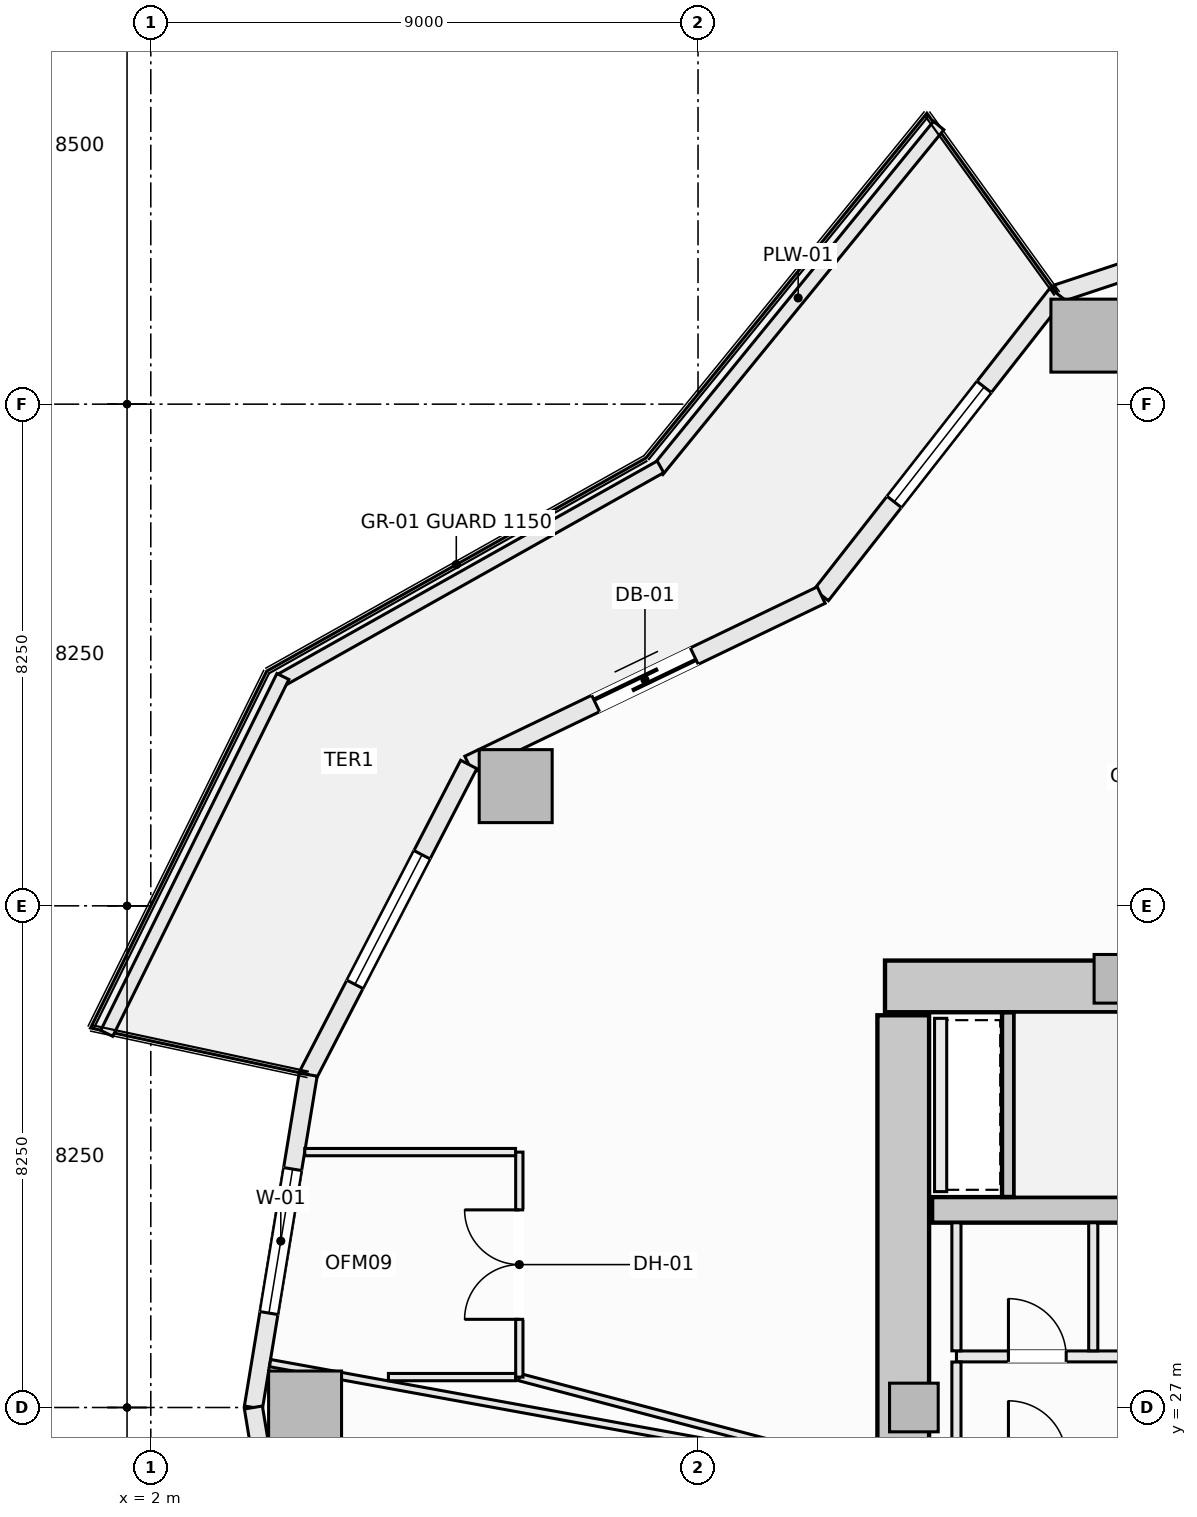
"""IFC4 building model, lengths in metres.
Left out: names, types, materials, properties, quantities, classifications, styles, units other than length and angle.
Written with IfcOpenShell. Run it as: python <this file> out.ifc"""

import sys

from ifc_helpers import new_model, si_unit, direction, frame, frame_2d, origin, origin_2d, place, context, subcontext, project, spatial, rectangle, extrude, element, fill, save


model = new_model("IFC4")
c1 = context("Model", 3, precision=1e-05, world=origin(), true_north=direction((0.0, 1.0)))
c2 = subcontext(c1, "Body", "Model", "MODEL_VIEW")
j1 = project(units=[si_unit("LENGTHUNIT", "METRE"), si_unit("PLANEANGLEUNIT", "RADIAN")], contexts=[c1])
p1 = place(None, origin())
s1 = spatial("IfcSite", under=j1, at=p1, CompositionType="ELEMENT")
p2 = place(p1, origin())
s2 = spatial("IfcBuilding", under=s1, at=p2, CompositionType="ELEMENT")
p3 = place(p2, frame((0.0, 0.0, 72.7)))
s3 = spatial("IfcBuildingStorey", under=s2, at=p3, CompositionType="ELEMENT", Elevation=72.7)
p4 = place(p3, frame((14.075, 33.925, -0.28), z_axis=(0.0, 0.0, 1.0), x_axis=(1.0, 0.0, 0.0)))
e1 = element("IfcWall", 1, at=p4, inside=s3, PredefinedType="SHEAR", context=c2, shape_type="SweptSolid", body=[
    extrude(rectangle(XDim=13.85, YDim=0.85, at=frame_2d((6.925, 0.0))), origin(), (0.0, 0.0, 1.0), 3.85),
])
p5 = place(p3, frame((14.375, 20.55, -0.28), z_axis=(0.0, 0.0, 1.0), x_axis=(0.0, 1.0, 0.0)))
e2 = element("IfcWall", 2, at=p5, inside=s3, PredefinedType="SHEAR", context=c2, shape_type="SweptSolid", body=[
    extrude(rectangle(XDim=12.9, YDim=0.85, at=frame_2d((6.45, 0.0))), origin(), (0.0, 0.0, 1.0), 3.85),
])
p6 = place(p3, frame((14.85, 30.25, -0.28), z_axis=(0.0, 0.0, 1.0), x_axis=(1.0, 0.0, 0.0)))
e3 = element("IfcWall", 3, at=p6, inside=s3, PredefinedType="SHEAR", context=c2, shape_type="SweptSolid", body=[
    extrude(rectangle(XDim=7.3, YDim=0.42, at=frame_2d((3.65, 0.0))), origin(), (0.0, 0.0, 1.0), 3.85),
])
for number, where, z_axis, x_axis in (
    (4, (17.404, 44.627, -0.28), (0.0, 0.0, 1.0), (1.0, 0.0, 0.0)),
    (5, (8.001, 37.219, -0.28), (0.0, 0.0, 1.0), (1.0, 0.0, 0.0)),
    (6, (4.538, 27.0, -0.28), (0.0, 0.0, 1.0), (1.0, 0.0, 0.0)),
):
    element("IfcColumn", number, at=place(p3, frame(where, z_axis=z_axis, x_axis=x_axis)), inside=s3, PredefinedType="COLUMN", context=c2, shape_type="SweptSolid", body=[
        extrude(rectangle(XDim=1.2, YDim=1.2, at=origin_2d()), origin(), (0.0, 0.0, 1.0), 3.85),
    ])
for number, where, z_axis, x_axis in (
    (7, (17.914, 34.05, -0.28), (0.0, 0.0, 1.0), (1.0, 0.0, 0.0)),
    (8, (14.55, 27.0, -0.28), (0.0, 0.0, 1.0), (1.0, 0.0, 0.0)),
):
    element("IfcColumn", number, at=place(p3, frame(where, z_axis=z_axis, x_axis=x_axis)), inside=s3, PredefinedType="PILASTER", context=c2, shape_type="SweptSolid", body=[
        extrude(rectangle(XDim=0.8, YDim=0.8, at=origin_2d()), origin(), (0.0, 0.0, 1.0), 3.85),
    ])
p7 = place(p3, frame((16.906, 45.316, 0.0), z_axis=(0.0, 0.0, 1.0), x_axis=(0.949245153629, 0.314537181127, 0.0)))
e9 = element("IfcWall", 9, at=p7, inside=s3, PredefinedType="SOLIDWALL", context=c2, shape_type="SweptSolid", body=[
    extrude(rectangle(XDim=6.717, YDim=0.3, at=frame_2d((3.358, 0.0))), origin(), (0.0, 0.0, 1.0), 3.093),
])
p8 = place(p7, frame((2.159, 0.0, 0.85)))
e10 = element("IfcOpeningElement", 10, at=p8, cuts=e9, PredefinedType="OPENING", context=c2, shape_type="SweptSolid", body=[
    extrude(rectangle(XDim=2.4, YDim=1.9, at=frame_2d((1.2, 0.95))), frame((0.0, 0.16, 0.0), z_axis=(0.0, -1.0, 0.0), x_axis=(1.0, 0.0, 0.0)), (0.0, 0.0, 1.0), 0.32),
])
p9 = place(p3, frame((13.026, 40.36, 0.0), z_axis=(0.0, 0.0, 1.0), x_axis=(0.616434798832, 0.78740595552, 0.0)))
e11 = element("IfcWall", 11, at=p9, inside=s3, PredefinedType="SOLIDWALL", context=c2, shape_type="SweptSolid", body=[
    extrude(rectangle(XDim=6.294, YDim=0.3, at=frame_2d((3.147, 0.0))), origin(), (0.0, 0.0, 1.0), 3.093),
])
p10 = place(p9, frame((1.947, 0.0, 0.85)))
e12 = element("IfcOpeningElement", 12, at=p10, cuts=e11, PredefinedType="OPENING", context=c2, shape_type="SweptSolid", body=[
    extrude(rectangle(XDim=2.4, YDim=1.9, at=frame_2d((1.2, 0.95))), frame((0.0, 0.16, 0.0), z_axis=(0.0, -1.0, 0.0), x_axis=(1.0, 0.0, 0.0)), (0.0, 0.0, 1.0), 0.32),
])
p11 = place(p3, frame((7.229, 37.575, 0.0), z_axis=(0.0, 0.0, 1.0), x_axis=(0.901354747727, 0.433081538224, 0.0)))
e13 = element("IfcWall", 13, at=p11, inside=s3, PredefinedType="SOLIDWALL", context=c2, shape_type="SweptSolid", body=[
    extrude(rectangle(XDim=6.431, YDim=0.3, at=frame_2d((3.215, 0.0))), origin(), (0.0, 0.0, 1.0), 3.093),
])
p12 = place(p11, frame((2.315, 0.0, 0.0)))
e14 = element("IfcOpeningElement", 14, at=p12, cuts=e13, PredefinedType="OPENING", context=c2, shape_type="SweptSolid", body=[
    extrude(rectangle(XDim=1.8, YDim=2.25, at=frame_2d((0.9, 1.125))), frame((0.0, 0.16, 0.0), z_axis=(0.0, -1.0, 0.0), x_axis=(1.0, 0.0, 0.0)), (0.0, 0.0, 1.0), 0.32),
])
p13 = place(p3, frame((4.588, 32.474, 0.0), z_axis=(0.0, 0.0, 1.0), x_axis=(0.459800981414, 0.888021991558, 0.0)))
e15 = element("IfcWall", 15, at=p13, inside=s3, PredefinedType="SOLIDWALL", context=c2, shape_type="SweptSolid", body=[
    extrude(rectangle(XDim=5.744, YDim=0.3, at=frame_2d((2.872, 0.0))), origin(), (0.0, 0.0, 1.0), 3.093),
])
p14 = place(p13, frame((1.672, 0.0, 0.85)))
e16 = element("IfcOpeningElement", 16, at=p14, cuts=e15, PredefinedType="OPENING", context=c2, shape_type="SweptSolid", body=[
    extrude(rectangle(XDim=2.4, YDim=1.9, at=frame_2d((1.2, 0.95))), frame((0.0, 0.16, 0.0), z_axis=(0.0, -1.0, 0.0), x_axis=(1.0, 0.0, 0.0)), (0.0, 0.0, 1.0), 0.32),
])
p15 = place(p3, frame((3.688, 27.0, 0.0), z_axis=(0.0, 0.0, 1.0), x_axis=(0.162386212206, 0.986727276447, 0.0)))
e17 = element("IfcWall", 17, at=p15, inside=s3, PredefinedType="SOLIDWALL", context=c2, shape_type="SweptSolid", body=[
    extrude(rectangle(XDim=5.548, YDim=0.3, at=frame_2d((2.774, 0.0))), origin(), (0.0, 0.0, 1.0), 3.093),
])
p16 = place(p15, frame((1.574, 0.0, 0.85)))
e18 = element("IfcOpeningElement", 18, at=p16, cuts=e17, PredefinedType="OPENING", context=c2, shape_type="SweptSolid", body=[
    extrude(rectangle(XDim=2.4, YDim=1.9, at=frame_2d((1.2, 0.95))), frame((0.0, 0.16, 0.0), z_axis=(0.0, -1.0, 0.0), x_axis=(1.0, 0.0, 0.0)), (0.0, 0.0, 1.0), 0.32),
])
p17 = place(p3, frame((3.688, 27.0, 0.0), z_axis=(0.0, 0.0, 1.0), x_axis=(0.162386212206, -0.986727276447, 0.0)))
e19 = element("IfcWall", 19, at=p17, inside=s3, PredefinedType="SOLIDWALL", context=c2, shape_type="SweptSolid", body=[
    extrude(rectangle(XDim=5.548, YDim=0.3, at=frame_2d((2.774, 0.0))), origin(), (0.0, 0.0, 1.0), 3.093),
])
p18 = place(p17, frame((1.574, 0.0, 0.85)))
e20 = element("IfcOpeningElement", 20, at=p18, cuts=e19, PredefinedType="OPENING", context=c2, shape_type="SweptSolid", body=[
    extrude(rectangle(XDim=2.4, YDim=1.9, at=frame_2d((1.2, 0.95))), frame((0.0, 0.16, 0.0), z_axis=(0.0, -1.0, 0.0), x_axis=(1.0, 0.0, 0.0)), (0.0, 0.0, 1.0), 0.32),
])
p19 = place(p3, frame((10.336, 42.411, 0.0), z_axis=(0.0, 0.0, 1.0), x_axis=(0.631819273026, 0.775115737315, 0.0)))
e21 = element("IfcWall", 21, at=p19, inside=s3, PredefinedType="PARAPET", context=c2, shape_type="SweptSolid", body=[
    extrude(rectangle(XDim=7.316, YDim=0.22, at=frame_2d((3.658, 0.0))), origin(), (0.0, 0.0, 1.0), 0.52),
])
p20 = place(p3, frame((4.147, 38.966, 0.0), z_axis=(0.0, 0.0, 1.0), x_axis=(0.871775109335, 0.489906275468, 0.0)))
e22 = element("IfcWall", 22, at=p20, inside=s3, PredefinedType="PARAPET", context=c2, shape_type="SweptSolid", body=[
    extrude(rectangle(XDim=7.152, YDim=0.22, at=frame_2d((3.576, 0.0))), origin(), (0.0, 0.0, 1.0), 0.52),
])
p21 = place(p3, frame((1.275, 33.153, 0.0), z_axis=(0.0, 0.0, 1.0), x_axis=(0.442686636348, 0.89667638644, 0.0)))
e23 = element("IfcWall", 23, at=p21, inside=s3, PredefinedType="PARAPET", context=c2, shape_type="SweptSolid", body=[
    extrude(rectangle(XDim=6.545, YDim=0.22, at=frame_2d((3.272, 0.0))), origin(), (0.0, 0.0, 1.0), 0.52),
])
p22 = place(p3, frame((16.1, 30.462, -0.28), z_axis=(0.0, 0.0, 1.0), x_axis=(0.0, 1.0, 0.0)))
e24 = element("IfcWall", 24, at=p22, inside=s3, PredefinedType="SHEAR", context=c2, shape_type="SweptSolid", body=[
    extrude(rectangle(XDim=3.036, YDim=0.2, at=frame_2d((1.518, 0.0))), origin(), (0.0, 0.0, 1.0), 3.85),
])
p23 = place(p3, frame((14.99, 30.55, 0.0), z_axis=(0.0, 0.0, 1.0), x_axis=(0.0, 1.0, 0.0)))
e25 = element("IfcWall", 25, at=p23, inside=s3, PredefinedType="SOLIDWALL", context=c2, shape_type="SweptSolid", body=[
    extrude(rectangle(XDim=2.85, YDim=0.2, at=frame_2d((1.425, 0.0))), origin(), (0.0, 0.0, 1.0), 3.57),
])
p24 = place(p3, frame((15.25, 27.84, 0.0), z_axis=(0.0, 0.0, 1.0), x_axis=(1.0, 0.0, 0.0)))
e26 = element("IfcWall", 26, at=p24, inside=s3, PredefinedType="SOLIDWALL", context=c2, shape_type="SweptSolid", body=[
    extrude(rectangle(XDim=6.9, YDim=0.18, at=frame_2d((3.45, 0.0))), origin(), (0.0, 0.0, 1.0), 3.57),
])
p25 = place(p24, frame((5.02, 0.0, 0.0)))
e27 = element("IfcOpeningElement", 27, at=p25, cuts=e26, PredefinedType="OPENING", context=c2, shape_type="SweptSolid", body=[
    extrude(rectangle(XDim=0.95, YDim=2.1, at=frame_2d((0.475, 1.05))), frame((0.0, 0.1, 0.0), z_axis=(0.0, -1.0, 0.0), x_axis=(1.0, 0.0, 0.0)), (0.0, 0.0, 1.0), 0.2),
])
p26 = place(p24, frame((0.855, 0.0, 0.0)))
e28 = element("IfcOpeningElement", 28, at=p26, cuts=e26, PredefinedType="OPENING", context=c2, shape_type="SweptSolid", body=[
    extrude(rectangle(XDim=0.95, YDim=2.1, at=frame_2d((0.475, 1.05))), frame((0.0, 0.1, 0.0), z_axis=(0.0, -1.0, 0.0), x_axis=(1.0, 0.0, 0.0)), (0.0, 0.0, 1.0), 0.2),
])
p27 = place(p24, frame((2.9, 0.0, 0.0)))
e29 = element("IfcOpeningElement", 29, at=p27, cuts=e26, PredefinedType="OPENING", context=c2, shape_type="SweptSolid", body=[
    extrude(rectangle(XDim=0.95, YDim=2.1, at=frame_2d((0.475, 1.05))), frame((0.0, 0.1, 0.0), z_axis=(0.0, -1.0, 0.0), x_axis=(1.0, 0.0, 0.0)), (0.0, 0.0, 1.0), 0.2),
])
p28 = place(p3, frame((15.25, 26.252, 0.0), z_axis=(0.0, 0.0, 1.0), x_axis=(0.0, 1.0, 0.0)))
e30 = element("IfcWall", 30, at=p28, inside=s3, PredefinedType="PARTITIONING", context=c2, shape_type="SweptSolid", body=[
    extrude(rectangle(XDim=1.496, YDim=0.15, at=frame_2d((0.748, 0.0))), origin(), (0.0, 0.0, 1.0), 3.57),
])
for number, where, z_axis, x_axis in (
    (31, (15.25, 27.932, 0.0), (0.0, 0.0, 1.0), (0.0, 1.0, 0.0)),
    (32, (17.5, 27.932, 0.0), (0.0, 0.0, 1.0), (0.0, 1.0, 0.0)),
):
    element("IfcWall", number, at=place(p3, frame(where, z_axis=z_axis, x_axis=x_axis)), inside=s3, PredefinedType="PARTITIONING", context=c2, shape_type="SweptSolid", body=[
        extrude(rectangle(XDim=2.106, YDim=0.15, at=frame_2d((1.053, 0.0))), origin(), (0.0, 0.0, 1.0), 3.57),
    ])
p29 = place(p3, frame((3.962, 27.73, 0.0), z_axis=(0.0, 0.0, 1.0), x_axis=(0.983849121981, -0.178999735131, 0.0)))
e33 = element("IfcWall", 33, at=p29, inside=s3, PredefinedType="PARTITIONING", context=c2, shape_type="SweptSolid", body=[
    extrude(rectangle(XDim=10.15, YDim=0.12, at=frame_2d((5.075, 0.0))), origin(), (0.0, 0.0, 1.0), 2.934),
])
p30 = place(p3, frame((8.061, 27.5, 0.0), z_axis=(0.0, 0.0, 1.0), x_axis=(0.96688100249, -0.255227598475, 0.0)))
e34 = element("IfcWall", 34, at=p30, inside=s3, PredefinedType="PARTITIONING", context=c2, shape_type="SweptSolid", body=[
    extrude(rectangle(XDim=4.582, YDim=0.12, at=frame_2d((2.291, 0.0))), origin(), (0.0, 0.0, 1.0), 2.934),
])
p31 = place(p3, frame((8.061, 27.5, 0.0), z_axis=(0.0, 0.0, 1.0), x_axis=(0.0, 1.0, 0.0)))
e35 = element("IfcWall", 35, at=p31, inside=s3, PredefinedType="PARTITIONING", context=c2, shape_type="SweptSolid", body=[
    extrude(rectangle(XDim=3.7, YDim=0.12, at=frame_2d((1.85, 0.0))), origin(), (0.0, 0.0, 1.0), 3.57),
])
p32 = place(p31, frame((0.95, 0.0, 0.0)))
e36 = element("IfcOpeningElement", 36, at=p32, cuts=e35, PredefinedType="OPENING", context=c2, shape_type="SweptSolid", body=[
    extrude(rectangle(XDim=1.8, YDim=2.3, at=frame_2d((0.9, 1.15))), frame((0.0, 0.07, 0.0), z_axis=(0.0, -1.0, 0.0), x_axis=(1.0, 0.0, 0.0)), (0.0, 0.0, 1.0), 0.14),
])
p33 = place(p3, frame((4.533, 31.2, 0.0), z_axis=(0.0, 0.0, 1.0), x_axis=(1.0, 0.0, 0.0)))
e37 = element("IfcWall", 37, at=p33, inside=s3, PredefinedType="PARTITIONING", context=c2, shape_type="SweptSolid", body=[
    extrude(rectangle(XDim=3.466, YDim=0.12, at=frame_2d((1.733, 0.0))), origin(), (0.0, 0.0, 1.0), 3.57),
])
p34 = place(p3, frame((5.908, 27.5, 0.0), z_axis=(0.0, 0.0, 1.0), x_axis=(1.0, 0.0, 0.0)))
e38 = element("IfcWall", 38, at=p34, inside=s3, PredefinedType="PARTITIONING", context=c2, shape_type="SweptSolid", body=[
    extrude(rectangle(XDim=2.091, YDim=0.12, at=frame_2d((1.045, 0.0))), origin(), (0.0, 0.0, 1.0), 3.57),
])
p35 = place(p10, origin())
e39 = element("IfcWindow", 39, at=p35, inside=s3, PartitioningType="SINGLE_PANEL", PredefinedType="WINDOW", context=c2, shape_type="SweptSolid", body=[
    extrude(rectangle(XDim=2.4, YDim=1.9, at=frame_2d((1.2, 0.95))), frame((0.0, 0.03, 0.0), z_axis=(0.0, -1.0, 0.0), x_axis=(1.0, 0.0, 0.0)), (0.0, 0.0, 1.0), 0.06),
])
fill(e12, e39)
p36 = place(p12, origin())
e40 = element("IfcDoor", 40, at=p36, inside=s3, OperationType="SLIDING_TO_LEFT", PredefinedType="DOOR", context=c2, shape_type="SweptSolid", body=[
    extrude(rectangle(XDim=1.8, YDim=2.25, at=frame_2d((0.9, 1.125))), frame((0.0, 0.025, 0.0), z_axis=(0.0, -1.0, 0.0), x_axis=(1.0, 0.0, 0.0)), (0.0, 0.0, 1.0), 0.05),
])
fill(e14, e40)
p37 = place(p14, origin())
e41 = element("IfcWindow", 41, at=p37, inside=s3, PartitioningType="SINGLE_PANEL", PredefinedType="WINDOW", context=c2, shape_type="SweptSolid", body=[
    extrude(rectangle(XDim=2.4, YDim=1.9, at=frame_2d((1.2, 0.95))), frame((0.0, 0.03, 0.0), z_axis=(0.0, -1.0, 0.0), x_axis=(1.0, 0.0, 0.0)), (0.0, 0.0, 1.0), 0.06),
])
fill(e16, e41)
p38 = place(p16, origin())
e42 = element("IfcWindow", 42, at=p38, inside=s3, PartitioningType="SINGLE_PANEL", PredefinedType="WINDOW", context=c2, shape_type="SweptSolid", body=[
    extrude(rectangle(XDim=2.4, YDim=1.9, at=frame_2d((1.2, 0.95))), frame((0.0, 0.03, 0.0), z_axis=(0.0, -1.0, 0.0), x_axis=(1.0, 0.0, 0.0)), (0.0, 0.0, 1.0), 0.06),
])
fill(e18, e42)
p39 = place(p26, origin())
e43 = element("IfcDoor", 43, at=p39, inside=s3, OperationType="SINGLE_SWING_LEFT", PredefinedType="DOOR", context=c2, shape_type="SweptSolid", body=[
    extrude(rectangle(XDim=0.95, YDim=2.1, at=frame_2d((0.475, 1.05))), frame((0.0, 0.025, 0.0), z_axis=(0.0, -1.0, 0.0), x_axis=(1.0, 0.0, 0.0)), (0.0, 0.0, 1.0), 0.05),
])
fill(e28, e43)
p40 = place(p32, origin())
e44 = element("IfcDoor", 44, at=p40, inside=s3, OperationType="DOUBLE_DOOR_SINGLE_SWING", PredefinedType="DOOR", context=c2, shape_type="SweptSolid", body=[
    extrude(rectangle(XDim=1.8, YDim=2.3, at=frame_2d((0.9, 1.15))), frame((0.0, 0.025, 0.0), z_axis=(0.0, -1.0, 0.0), x_axis=(1.0, 0.0, 0.0)), (0.0, 0.0, 1.0), 0.05),
])
fill(e36, e44)
save(model, sys.argv[1])
